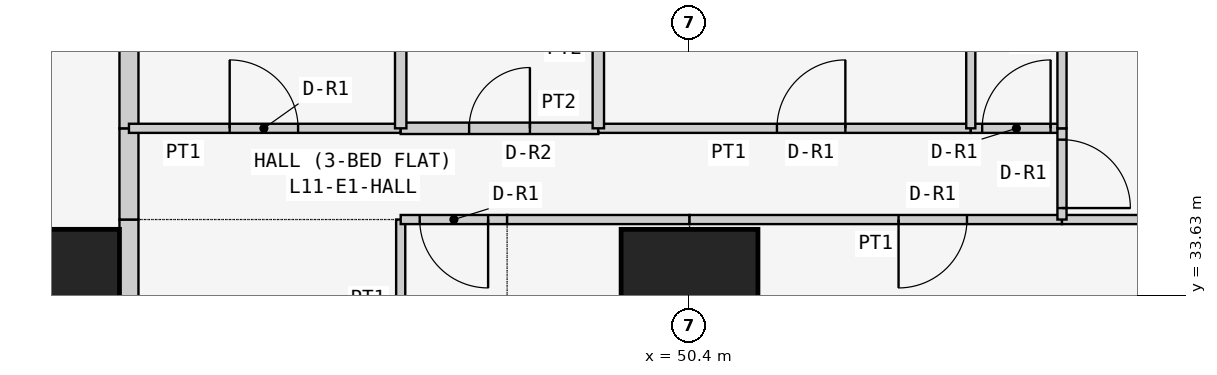
"""IFC4 building model, lengths in metres.
Left out: names, types, materials, properties, quantities, classifications, styles, units other than length and angle.
Written with IfcOpenShell. Run it as: python <this file> out.ifc"""

import sys

from ifc_helpers import new_model, si_unit, direction, frame, frame_2d, origin, origin_2d, place, context, subcontext, project, spatial, rectangle, extrude, element, fill, save


model = new_model("IFC4")
c1 = context("Model", 3, precision=1e-05, world=origin(), true_north=direction((0.0, 1.0)))
c2 = subcontext(c1, "Body", "Model", "MODEL_VIEW")
j1 = project(units=[si_unit("LENGTHUNIT", "METRE"), si_unit("PLANEANGLEUNIT", "RADIAN")], contexts=[c1])
p1 = place(None, origin())
s1 = spatial("IfcSite", under=j1, at=p1, CompositionType="ELEMENT")
p2 = place(p1, origin())
s2 = spatial("IfcBuilding", under=s1, at=p2, CompositionType="ELEMENT")
p3 = place(p2, frame((0.0, 0.0, 48.9)))
s3 = spatial("IfcBuildingStorey", under=s2, at=p3, CompositionType="ELEMENT", Elevation=48.9)
for number, where, z_axis, x_axis in (
    (1, (42.0, 33.6, 0.0), (0.0, 0.0, 1.0), (1.0, 0.0, 0.0)),
    (2, (50.4, 33.6, 0.0), (0.0, 0.0, 1.0), (1.0, 0.0, 0.0)),
):
    element("IfcColumn", number, at=place(p3, frame(where, z_axis=z_axis, x_axis=x_axis)), inside=s3, PredefinedType="COLUMN", context=c2, shape_type="SweptSolid", body=[
        extrude(rectangle(XDim=1.8, YDim=1.8, at=origin_2d()), origin(), (0.0, 0.0, 1.0), 3.6),
    ])
p4 = place(p3, frame((43.025, 34.629, 0.0), z_axis=(0.0, 0.0, 1.0), x_axis=(0.0, -1.0, 0.0)))
e3 = element("IfcWall", 3, at=p4, inside=s3, PredefinedType="PARTITIONING", context=c2, shape_type="SweptSolid", body=[
    extrude(rectangle(XDim=5.229, YDim=0.25, at=frame_2d((2.615, 0.0))), origin(), (0.0, 0.0, 1.0), 3.45),
])
p5 = place(p4, frame((2.129, 0.0, 0.0)))
e4 = element("IfcOpeningElement", 4, at=p5, cuts=e3, PredefinedType="OPENING", context=c2, shape_type="SweptSolid", body=[
    extrude(rectangle(XDim=1.0, YDim=2.1, at=frame_2d((0.5, 1.05))), frame((0.0, 0.135, 0.0), z_axis=(0.0, -1.0, 0.0), x_axis=(1.0, 0.0, 0.0)), (0.0, 0.0, 1.0), 0.27),
])
p6 = place(p3, frame((43.025, 35.829, 0.0), z_axis=(0.0, 0.0, 1.0), x_axis=(0.0, -1.0, 0.0)))
e5 = element("IfcWall", 5, at=p6, inside=s3, PredefinedType="PARTITIONING", context=c2, shape_type="SweptSolid", body=[
    extrude(rectangle(XDim=1.2, YDim=0.25, at=frame_2d((0.6, 0.0))), origin(), (0.0, 0.0, 1.0), 3.45),
])
p7 = place(p3, frame((43.025, 42.7, 0.0), z_axis=(0.0, 0.0, 1.0), x_axis=(0.0, -1.0, 0.0)))
e6 = element("IfcWall", 6, at=p7, inside=s3, PredefinedType="PARTITIONING", context=c2, shape_type="SweptSolid", body=[
    extrude(rectangle(XDim=6.871, YDim=0.25, at=frame_2d((3.436, 0.0))), origin(), (0.0, 0.0, 1.0), 3.45),
])
p8 = place(p3, frame((46.6, 29.4, 0.0), z_axis=(0.0, 0.0, 1.0), x_axis=(0.0, 1.0, 0.0)))
e7 = element("IfcWall", 7, at=p8, inside=s3, PredefinedType="PARTITIONING", context=c2, shape_type="SweptSolid", body=[
    extrude(rectangle(XDim=5.229, YDim=0.12, at=frame_2d((2.615, 0.0))), origin(), (0.0, 0.0, 1.0), 3.45),
])
p9 = place(p3, frame((48.0, 34.629, 0.0), z_axis=(0.0, 0.0, 1.0), x_axis=(-1.0, 0.0, 0.0)))
e8 = element("IfcWall", 8, at=p9, inside=s3, PredefinedType="PARTITIONING", context=c2, shape_type="SweptSolid", body=[
    extrude(rectangle(XDim=1.4, YDim=0.12, at=frame_2d((0.7, 0.0))), origin(), (0.0, 0.0, 1.0), 3.45),
])
p10 = place(p9, frame((0.25, 0.0, 0.0)))
e9 = element("IfcOpeningElement", 9, at=p10, cuts=e8, PredefinedType="OPENING", context=c2, shape_type="SweptSolid", body=[
    extrude(rectangle(XDim=0.9, YDim=2.1, at=frame_2d((0.45, 1.05))), frame((0.0, 0.07, 0.0), z_axis=(0.0, -1.0, 0.0), x_axis=(1.0, 0.0, 0.0)), (0.0, 0.0, 1.0), 0.14),
])
p11 = place(p3, frame((50.4, 34.629, 0.0), z_axis=(0.0, 0.0, 1.0), x_axis=(-1.0, 0.0, 0.0)))
e10 = element("IfcWall", 10, at=p11, inside=s3, PredefinedType="PARTITIONING", context=c2, shape_type="SweptSolid", body=[
    extrude(rectangle(XDim=2.4, YDim=0.12, at=frame_2d((1.2, 0.0))), origin(), (0.0, 0.0, 1.0), 3.45),
])
p12 = place(p3, frame((55.3, 34.629, 0.0), z_axis=(0.0, 0.0, 1.0), x_axis=(-1.0, 0.0, 0.0)))
e11 = element("IfcWall", 11, at=p12, inside=s3, PredefinedType="PARTITIONING", context=c2, shape_type="SweptSolid", body=[
    extrude(rectangle(XDim=4.9, YDim=0.12, at=frame_2d((2.45, 0.0))), origin(), (0.0, 0.0, 1.0), 3.45),
])
p13 = place(p12, frame((1.25, 0.0, 0.0)))
e12 = element("IfcOpeningElement", 12, at=p13, cuts=e11, PredefinedType="OPENING", context=c2, shape_type="SweptSolid", body=[
    extrude(rectangle(XDim=0.9, YDim=2.1, at=frame_2d((0.45, 1.05))), frame((0.0, 0.07, 0.0), z_axis=(0.0, -1.0, 0.0), x_axis=(1.0, 0.0, 0.0)), (0.0, 0.0, 1.0), 0.14),
])
p14 = place(p3, frame((59.45, 34.629, 0.0), z_axis=(0.0, 0.0, 1.0), x_axis=(-1.0, 0.0, 0.0)))
e13 = element("IfcWall", 13, at=p14, inside=s3, PredefinedType="PARTITIONING", context=c2, shape_type="SweptSolid", body=[
    extrude(rectangle(XDim=4.15, YDim=0.12, at=frame_2d((2.075, 0.0))), origin(), (0.0, 0.0, 1.0), 3.45),
])
p15 = place(p3, frame((46.6, 35.829, 0.0), z_axis=(0.0, 0.0, 1.0), x_axis=(-1.0, 0.0, 0.0)))
e14 = element("IfcWall", 14, at=p15, inside=s3, PredefinedType="PARTITIONING", context=c2, shape_type="SweptSolid", body=[
    extrude(rectangle(XDim=3.575, YDim=0.12, at=frame_2d((1.788, 0.0))), origin(), (0.0, 0.0, 1.0), 3.45),
])
p16 = place(p15, frame((1.35, 0.0, 0.0)))
e15 = element("IfcOpeningElement", 15, at=p16, cuts=e14, PredefinedType="OPENING", context=c2, shape_type="SweptSolid", body=[
    extrude(rectangle(XDim=0.9, YDim=2.1, at=frame_2d((0.45, 1.05))), frame((0.0, 0.07, 0.0), z_axis=(0.0, -1.0, 0.0), x_axis=(1.0, 0.0, 0.0)), (0.0, 0.0, 1.0), 0.14),
])
p17 = place(p3, frame((49.2, 35.829, 0.0), z_axis=(0.0, 0.0, 1.0), x_axis=(-1.0, 0.0, 0.0)))
e16 = element("IfcWall", 16, at=p17, inside=s3, PredefinedType="PARTITIONING", context=c2, shape_type="SweptSolid", body=[
    extrude(rectangle(XDim=2.6, YDim=0.15, at=frame_2d((1.3, 0.0))), origin(), (0.0, 0.0, 1.0), 3.45),
])
p18 = place(p17, frame((0.9, 0.0, 0.0)))
e17 = element("IfcOpeningElement", 17, at=p18, cuts=e16, PredefinedType="OPENING", context=c2, shape_type="SweptSolid", body=[
    extrude(rectangle(XDim=0.8, YDim=2.1, at=frame_2d((0.4, 1.05))), frame((0.0, 0.085, 0.0), z_axis=(0.0, -1.0, 0.0), x_axis=(1.0, 0.0, 0.0)), (0.0, 0.0, 1.0), 0.17),
])
p19 = place(p3, frame((54.1, 35.829, 0.0), z_axis=(0.0, 0.0, 1.0), x_axis=(-1.0, 0.0, 0.0)))
e18 = element("IfcWall", 18, at=p19, inside=s3, PredefinedType="PARTITIONING", context=c2, shape_type="SweptSolid", body=[
    extrude(rectangle(XDim=4.9, YDim=0.12, at=frame_2d((2.45, 0.0))), origin(), (0.0, 0.0, 1.0), 3.45),
])
p20 = place(p19, frame((1.65, 0.0, 0.0)))
e19 = element("IfcOpeningElement", 19, at=p20, cuts=e18, PredefinedType="OPENING", context=c2, shape_type="SweptSolid", body=[
    extrude(rectangle(XDim=0.9, YDim=2.1, at=frame_2d((0.45, 1.05))), frame((0.0, 0.07, 0.0), z_axis=(0.0, -1.0, 0.0), x_axis=(1.0, 0.0, 0.0)), (0.0, 0.0, 1.0), 0.14),
])
p21 = place(p3, frame((55.3, 35.829, 0.0), z_axis=(0.0, 0.0, 1.0), x_axis=(-1.0, 0.0, 0.0)))
e20 = element("IfcWall", 20, at=p21, inside=s3, PredefinedType="PARTITIONING", context=c2, shape_type="SweptSolid", body=[
    extrude(rectangle(XDim=1.2, YDim=0.12, at=frame_2d((0.6, 0.0))), origin(), (0.0, 0.0, 1.0), 3.45),
])
p22 = place(p21, frame((0.15, 0.0, 0.0)))
e21 = element("IfcOpeningElement", 21, at=p22, cuts=e20, PredefinedType="OPENING", context=c2, shape_type="SweptSolid", body=[
    extrude(rectangle(XDim=0.9, YDim=2.1, at=frame_2d((0.45, 1.05))), frame((0.0, 0.07, 0.0), z_axis=(0.0, -1.0, 0.0), x_axis=(1.0, 0.0, 0.0)), (0.0, 0.0, 1.0), 0.14),
])
p23 = place(p3, frame((55.3, 34.629, 0.0), z_axis=(0.0, 0.0, 1.0), x_axis=(0.0, 1.0, 0.0)))
e22 = element("IfcWall", 22, at=p23, inside=s3, PredefinedType="PARTITIONING", context=c2, shape_type="SweptSolid", body=[
    extrude(rectangle(XDim=1.2, YDim=0.12, at=frame_2d((0.6, 0.0))), origin(), (0.0, 0.0, 1.0), 3.45),
])
p24 = place(p23, frame((0.151, 0.0, 0.0)))
e23 = element("IfcOpeningElement", 23, at=p24, cuts=e22, PredefinedType="OPENING", context=c2, shape_type="SweptSolid", body=[
    extrude(rectangle(XDim=0.9, YDim=2.1, at=frame_2d((0.45, 1.05))), frame((0.0, 0.07, 0.0), z_axis=(0.0, -1.0, 0.0), x_axis=(1.0, 0.0, 0.0)), (0.0, 0.0, 1.0), 0.14),
])
for number, where, z_axis, x_axis in (
    (24, (46.6, 35.829, 0.0), (0.0, 0.0, 1.0), (0.0, 1.0, 0.0)),
    (25, (49.2, 35.829, 0.0), (0.0, 0.0, 1.0), (0.0, 1.0, 0.0)),
):
    element("IfcWall", number, at=place(p3, frame(where, z_axis=z_axis, x_axis=x_axis)), inside=s3, PredefinedType="PARTITIONING", context=c2, shape_type="SweptSolid", body=[
        extrude(rectangle(XDim=2.971, YDim=0.15, at=frame_2d((1.485, 0.0))), origin(), (0.0, 0.0, 1.0), 3.45),
    ])
for number, where, z_axis, x_axis in (
    (26, (54.1, 35.829, 0.0), (0.0, 0.0, 1.0), (0.0, 1.0, 0.0)),
    (27, (55.3, 35.829, 0.0), (0.0, 0.0, 1.0), (0.0, 1.0, 0.0)),
):
    element("IfcWall", number, at=place(p3, frame(where, z_axis=z_axis, x_axis=x_axis)), inside=s3, PredefinedType="PARTITIONING", context=c2, shape_type="SweptSolid", body=[
        extrude(rectangle(XDim=2.285, YDim=0.12, at=frame_2d((1.143, 0.0))), origin(), (0.0, 0.0, 1.0), 3.45),
    ])
p25 = place(p10, origin())
e28 = element("IfcDoor", 28, at=p25, inside=s3, OperationType="SINGLE_SWING_LEFT", PredefinedType="DOOR", context=c2, shape_type="SweptSolid", body=[
    extrude(rectangle(XDim=0.9, YDim=2.1, at=frame_2d((0.45, 1.05))), frame((0.0, 0.025, 0.0), z_axis=(0.0, -1.0, 0.0), x_axis=(1.0, 0.0, 0.0)), (0.0, 0.0, 1.0), 0.05),
])
fill(e9, e28)
p26 = place(p13, origin())
e29 = element("IfcDoor", 29, at=p26, inside=s3, OperationType="SINGLE_SWING_RIGHT", PredefinedType="DOOR", context=c2, shape_type="SweptSolid", body=[
    extrude(rectangle(XDim=0.9, YDim=2.1, at=frame_2d((0.45, 1.05))), frame((0.0, 0.025, 0.0), z_axis=(0.0, -1.0, 0.0), x_axis=(1.0, 0.0, 0.0)), (0.0, 0.0, 1.0), 0.05),
])
fill(e12, e29)
p27 = place(p16, frame((0.9, 0.0, 0.0), z_axis=(0.0, 0.0, 1.0), x_axis=(-1.0, 0.0, 0.0)))
e30 = element("IfcDoor", 30, at=p27, inside=s3, OperationType="SINGLE_SWING_LEFT", PredefinedType="DOOR", context=c2, shape_type="SweptSolid", body=[
    extrude(rectangle(XDim=0.9, YDim=2.1, at=frame_2d((0.45, 1.05))), frame((0.0, 0.025, 0.0), z_axis=(0.0, -1.0, 0.0), x_axis=(1.0, 0.0, 0.0)), (0.0, 0.0, 1.0), 0.05),
])
fill(e15, e30)
p28 = place(p18, frame((0.8, 0.0, 0.0), z_axis=(0.0, 0.0, 1.0), x_axis=(-1.0, 0.0, 0.0)))
e31 = element("IfcDoor", 31, at=p28, inside=s3, OperationType="SINGLE_SWING_RIGHT", PredefinedType="DOOR", context=c2, shape_type="SweptSolid", body=[
    extrude(rectangle(XDim=0.8, YDim=2.1, at=frame_2d((0.4, 1.05))), frame((0.0, 0.025, 0.0), z_axis=(0.0, -1.0, 0.0), x_axis=(1.0, 0.0, 0.0)), (0.0, 0.0, 1.0), 0.05),
])
fill(e17, e31)
p29 = place(p20, frame((0.9, 0.0, 0.0), z_axis=(0.0, 0.0, 1.0), x_axis=(-1.0, 0.0, 0.0)))
e32 = element("IfcDoor", 32, at=p29, inside=s3, OperationType="SINGLE_SWING_RIGHT", PredefinedType="DOOR", context=c2, shape_type="SweptSolid", body=[
    extrude(rectangle(XDim=0.9, YDim=2.1, at=frame_2d((0.45, 1.05))), frame((0.0, 0.025, 0.0), z_axis=(0.0, -1.0, 0.0), x_axis=(1.0, 0.0, 0.0)), (0.0, 0.0, 1.0), 0.05),
])
fill(e19, e32)
p30 = place(p22, frame((0.9, 0.0, 0.0), z_axis=(0.0, 0.0, 1.0), x_axis=(-1.0, 0.0, 0.0)))
e33 = element("IfcDoor", 33, at=p30, inside=s3, OperationType="SINGLE_SWING_RIGHT", PredefinedType="DOOR", context=c2, shape_type="SweptSolid", body=[
    extrude(rectangle(XDim=0.9, YDim=2.1, at=frame_2d((0.45, 1.05))), frame((0.0, 0.025, 0.0), z_axis=(0.0, -1.0, 0.0), x_axis=(1.0, 0.0, 0.0)), (0.0, 0.0, 1.0), 0.05),
])
fill(e21, e33)
p31 = place(p24, frame((0.9, 0.0, 0.0), z_axis=(0.0, 0.0, 1.0), x_axis=(-1.0, 0.0, 0.0)))
e34 = element("IfcDoor", 34, at=p31, inside=s3, OperationType="SINGLE_SWING_RIGHT", PredefinedType="DOOR", context=c2, shape_type="SweptSolid", body=[
    extrude(rectangle(XDim=0.9, YDim=2.1, at=frame_2d((0.45, 1.05))), frame((0.0, 0.025, 0.0), z_axis=(0.0, -1.0, 0.0), x_axis=(1.0, 0.0, 0.0)), (0.0, 0.0, 1.0), 0.05),
])
fill(e23, e34)
save(model, sys.argv[1])
